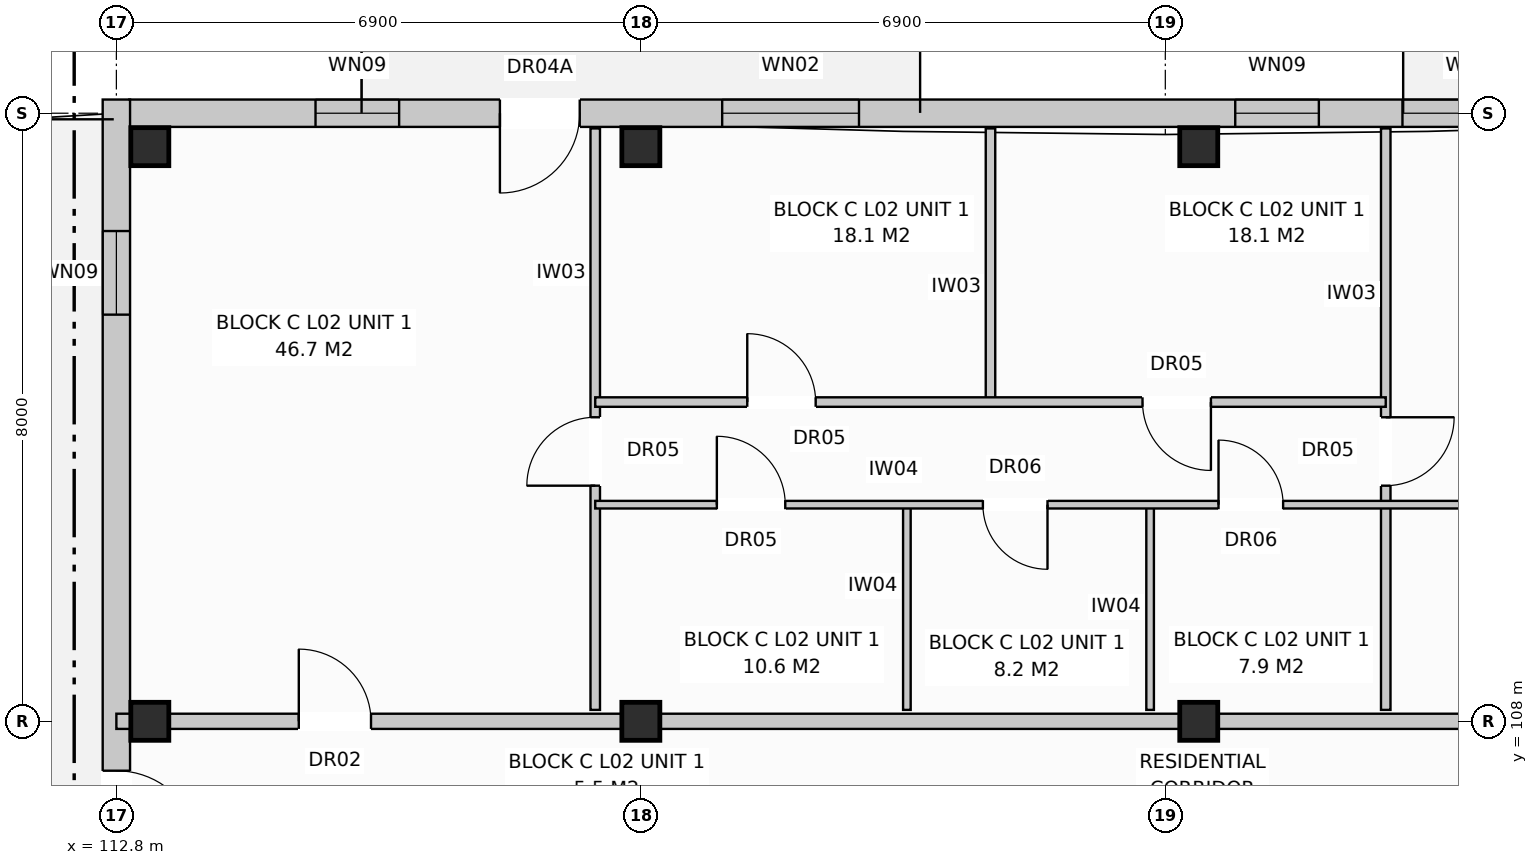
"""IFC4 building model, lengths in metres.
Left out: names, types, materials, properties, quantities, classifications, styles, units other than length and angle.
Written with IfcOpenShell. Run it as: python <this file> out.ifc"""

import sys

from ifc_helpers import new_model, si_unit, direction, frame, frame_2d, origin, origin_with_axes, origin_2d, place, context, subcontext, project, spatial, rectangle, extrude, element, fill, save


model = new_model("IFC4")
c1 = context("Model", 3, precision=1e-05, world=origin(), true_north=direction((0.0, 1.0)))
c2 = subcontext(c1, "Body", "Model", "MODEL_VIEW")
j1 = project(units=[si_unit("LENGTHUNIT", "METRE"), si_unit("PLANEANGLEUNIT", "RADIAN")], contexts=[c1])
p1 = place(None, origin())
s1 = spatial("IfcSite", under=j1, at=p1, CompositionType="ELEMENT")
p2 = place(p1, origin())
s2 = spatial("IfcBuilding", under=s1, at=p2, CompositionType="ELEMENT")
p3 = place(p2, frame((0.0, 0.0, 8.0)))
s3 = spatial("IfcBuildingStorey", under=s2, at=p3, CompositionType="ELEMENT", Elevation=8.0)
for number, where, z_axis, x_axis in (
    (1, (113.24, 108.0, 0.0), (0.0, 0.0, 1.0), (1.0, 0.0, 0.0)),
    (2, (113.24, 115.56, 0.0), (0.0, 0.0, 1.0), (1.0, 0.0, 0.0)),
    (3, (119.7, 108.0, 0.0), (0.0, 0.0, 1.0), (1.0, 0.0, 0.0)),
    (4, (119.7, 115.56, 0.0), (0.0, 0.0, 1.0), (1.0, 0.0, 0.0)),
    (5, (127.04, 108.0, 0.0), (0.0, 0.0, 1.0), (1.0, 0.0, 0.0)),
    (6, (127.04, 115.56, 0.0), (0.0, 0.0, 1.0), (1.0, 0.0, 0.0)),
):
    element("IfcColumn", number, at=place(p3, frame(where, z_axis=z_axis, x_axis=x_axis)), inside=s3, PredefinedType="COLUMN", context=c2, shape_type="SweptSolid", body=[
        extrude(rectangle(XDim=0.5, YDim=0.5, at=origin_2d()), origin(), (0.0, 0.0, 1.0), 3.2),
    ])
p4 = place(p3, frame((112.97, 116.0, 0.0), z_axis=(0.0, 0.0, 1.0), x_axis=(1.0, 0.0, 0.0)))
e7 = element("IfcWall", 7, at=p4, inside=s3, PredefinedType="STANDARD", context=c2, shape_type="SweptSolid", body=[
    extrude(rectangle(XDim=54.86, YDim=0.36, at=frame_2d((27.43, 0.0))), origin(), (0.0, 0.0, 1.0), 2.94),
])
p5 = place(p4, frame((4.876, 0.0, 0.0)))
e8 = element("IfcOpeningElement", 8, at=p5, cuts=e7, PredefinedType="OPENING", context=c2, shape_type="SweptSolid", body=[
    extrude(rectangle(XDim=1.05, YDim=2.12, at=frame_2d((0.525, 1.06))), frame((0.0, 0.192, 0.0), z_axis=(0.0, -1.0, 0.0), x_axis=(1.0, 0.0, 0.0)), (0.0, 0.0, 1.0), 0.384),
])
p6 = place(p4, frame((18.879, 0.0, 0.0)))
e9 = element("IfcOpeningElement", 9, at=p6, cuts=e7, PredefinedType="OPENING", context=c2, shape_type="SweptSolid", body=[
    extrude(rectangle(XDim=1.05, YDim=2.12, at=frame_2d((0.525, 1.06))), frame((0.0, 0.192, 0.0), z_axis=(0.0, -1.0, 0.0), x_axis=(1.0, 0.0, 0.0)), (0.0, 0.0, 1.0), 0.384),
])
p7 = place(p4, frame((31.379, 0.0, 0.0)))
e10 = element("IfcOpeningElement", 10, at=p7, cuts=e7, PredefinedType="OPENING", context=c2, shape_type="SweptSolid", body=[
    extrude(rectangle(XDim=1.05, YDim=2.12, at=frame_2d((0.525, 1.06))), frame((0.0, 0.192, 0.0), z_axis=(0.0, -1.0, 0.0), x_axis=(1.0, 0.0, 0.0)), (0.0, 0.0, 1.0), 0.384),
])
p8 = place(p4, frame((46.45, 0.0, 0.0)))
e11 = element("IfcOpeningElement", 11, at=p8, cuts=e7, PredefinedType="OPENING", context=c2, shape_type="SweptSolid", body=[
    extrude(rectangle(XDim=1.05, YDim=2.12, at=frame_2d((0.525, 1.06))), frame((0.0, 0.192, 0.0), z_axis=(0.0, -1.0, 0.0), x_axis=(1.0, 0.0, 0.0)), (0.0, 0.0, 1.0), 0.384),
])
p9 = place(p4, frame((2.45, 0.0, 0.72)))
e12 = element("IfcOpeningElement", 12, at=p9, cuts=e7, PredefinedType="OPENING", context=c2, shape_type="SweptSolid", body=[
    extrude(rectangle(XDim=1.1, YDim=1.5, at=frame_2d((0.55, 0.75))), frame((0.0, 0.192, 0.0), z_axis=(0.0, -1.0, 0.0), x_axis=(1.0, 0.0, 0.0)), (0.0, 0.0, 1.0), 0.384),
])
p10 = place(p4, frame((7.8, 0.0, 0.8)))
e13 = element("IfcOpeningElement", 13, at=p10, cuts=e7, PredefinedType="OPENING", context=c2, shape_type="SweptSolid", body=[
    extrude(rectangle(XDim=1.8, YDim=1.7, at=frame_2d((0.9, 0.85))), frame((0.0, 0.192, 0.0), z_axis=(0.0, -1.0, 0.0), x_axis=(1.0, 0.0, 0.0)), (0.0, 0.0, 1.0), 0.384),
])
p11 = place(p4, frame((14.55, 0.0, 0.72)))
e14 = element("IfcOpeningElement", 14, at=p11, cuts=e7, PredefinedType="OPENING", context=c2, shape_type="SweptSolid", body=[
    extrude(rectangle(XDim=1.1, YDim=1.5, at=frame_2d((0.55, 0.75))), frame((0.0, 0.192, 0.0), z_axis=(0.0, -1.0, 0.0), x_axis=(1.0, 0.0, 0.0)), (0.0, 0.0, 1.0), 0.384),
])
p12 = place(p4, frame((16.75, 0.0, 0.8)))
e15 = element("IfcOpeningElement", 15, at=p12, cuts=e7, PredefinedType="OPENING", context=c2, shape_type="SweptSolid", body=[
    extrude(rectangle(XDim=1.9, YDim=1.85, at=frame_2d((0.95, 0.925))), frame((0.0, 0.192, 0.0), z_axis=(0.0, -1.0, 0.0), x_axis=(1.0, 0.0, 0.0)), (0.0, 0.0, 1.0), 0.384),
])
p13 = place(p4, frame((21.6, 0.0, 0.8)))
e16 = element("IfcOpeningElement", 16, at=p13, cuts=e7, PredefinedType="OPENING", context=c2, shape_type="SweptSolid", body=[
    extrude(rectangle(XDim=1.8, YDim=1.7, at=frame_2d((0.9, 0.85))), frame((0.0, 0.192, 0.0), z_axis=(0.0, -1.0, 0.0), x_axis=(1.0, 0.0, 0.0)), (0.0, 0.0, 1.0), 0.384),
])
p14 = place(p4, frame((25.35, 0.0, 0.72)))
e17 = element("IfcOpeningElement", 17, at=p14, cuts=e7, PredefinedType="OPENING", context=c2, shape_type="SweptSolid", body=[
    extrude(rectangle(XDim=1.1, YDim=1.5, at=frame_2d((0.55, 0.75))), frame((0.0, 0.192, 0.0), z_axis=(0.0, -1.0, 0.0), x_axis=(1.0, 0.0, 0.0)), (0.0, 0.0, 1.0), 0.384),
])
p15 = place(p4, frame((29.55, 0.0, 0.72)))
e18 = element("IfcOpeningElement", 18, at=p15, cuts=e7, PredefinedType="OPENING", context=c2, shape_type="SweptSolid", body=[
    extrude(rectangle(XDim=1.1, YDim=1.5, at=frame_2d((0.55, 0.75))), frame((0.0, 0.192, 0.0), z_axis=(0.0, -1.0, 0.0), x_axis=(1.0, 0.0, 0.0)), (0.0, 0.0, 1.0), 0.384),
])
p16 = place(p4, frame((34.9, 0.0, 0.8)))
e19 = element("IfcOpeningElement", 19, at=p16, cuts=e7, PredefinedType="OPENING", context=c2, shape_type="SweptSolid", body=[
    extrude(rectangle(XDim=1.8, YDim=1.7, at=frame_2d((0.9, 0.85))), frame((0.0, 0.192, 0.0), z_axis=(0.0, -1.0, 0.0), x_axis=(1.0, 0.0, 0.0)), (0.0, 0.0, 1.0), 0.384),
])
p17 = place(p4, frame((38.45, 0.0, 0.72)))
e20 = element("IfcOpeningElement", 20, at=p17, cuts=e7, PredefinedType="OPENING", context=c2, shape_type="SweptSolid", body=[
    extrude(rectangle(XDim=1.1, YDim=1.5, at=frame_2d((0.55, 0.75))), frame((0.0, 0.192, 0.0), z_axis=(0.0, -1.0, 0.0), x_axis=(1.0, 0.0, 0.0)), (0.0, 0.0, 1.0), 0.384),
])
p18 = place(p4, frame((42.85, 0.0, 0.72)))
e21 = element("IfcOpeningElement", 21, at=p18, cuts=e7, PredefinedType="OPENING", context=c2, shape_type="SweptSolid", body=[
    extrude(rectangle(XDim=1.1, YDim=1.5, at=frame_2d((0.55, 0.75))), frame((0.0, 0.192, 0.0), z_axis=(0.0, -1.0, 0.0), x_axis=(1.0, 0.0, 0.0)), (0.0, 0.0, 1.0), 0.384),
])
p19 = place(p4, frame((49.2, 0.0, 0.8)))
e22 = element("IfcOpeningElement", 22, at=p19, cuts=e7, PredefinedType="OPENING", context=c2, shape_type="SweptSolid", body=[
    extrude(rectangle(XDim=1.8, YDim=1.7, at=frame_2d((0.9, 0.85))), frame((0.0, 0.192, 0.0), z_axis=(0.0, -1.0, 0.0), x_axis=(1.0, 0.0, 0.0)), (0.0, 0.0, 1.0), 0.384),
])
p20 = place(p4, frame((52.95, 0.0, 0.72)))
e23 = element("IfcOpeningElement", 23, at=p20, cuts=e7, PredefinedType="OPENING", context=c2, shape_type="SweptSolid", body=[
    extrude(rectangle(XDim=1.1, YDim=1.5, at=frame_2d((0.55, 0.75))), frame((0.0, 0.192, 0.0), z_axis=(0.0, -1.0, 0.0), x_axis=(1.0, 0.0, 0.0)), (0.0, 0.0, 1.0), 0.384),
])
p21 = place(p3, frame((112.8, 97.42, 0.0), z_axis=(0.0, 0.0, 1.0), x_axis=(0.0, 1.0, 0.0)))
e24 = element("IfcWall", 24, at=p21, inside=s3, PredefinedType="STANDARD", context=c2, shape_type="SweptSolid", body=[
    extrude(rectangle(XDim=18.76, YDim=0.36, at=frame_2d((9.38, 0.0))), origin(), (0.0, 0.0, 1.0), 2.94),
])
p22 = place(p21, frame((8.83, 0.0, 0.0)))
e25 = element("IfcOpeningElement", 25, at=p22, cuts=e24, PredefinedType="OPENING", context=c2, shape_type="SweptSolid", body=[
    extrude(rectangle(XDim=1.1, YDim=2.1, at=frame_2d((0.55, 1.05))), frame((0.0, 0.192, 0.0), z_axis=(0.0, -1.0, 0.0), x_axis=(1.0, 0.0, 0.0)), (0.0, 0.0, 1.0), 0.384),
])
p23 = place(p21, frame((1.73, 0.0, 0.72)))
e26 = element("IfcOpeningElement", 26, at=p23, cuts=e24, PredefinedType="OPENING", context=c2, shape_type="SweptSolid", body=[
    extrude(rectangle(XDim=1.1, YDim=1.5, at=frame_2d((0.55, 0.75))), frame((0.0, 0.192, 0.0), z_axis=(0.0, -1.0, 0.0), x_axis=(1.0, 0.0, 0.0)), (0.0, 0.0, 1.0), 0.384),
])
p24 = place(p21, frame((15.93, 0.0, 0.72)))
e27 = element("IfcOpeningElement", 27, at=p24, cuts=e24, PredefinedType="OPENING", context=c2, shape_type="SweptSolid", body=[
    extrude(rectangle(XDim=1.1, YDim=1.5, at=frame_2d((0.55, 0.75))), frame((0.0, 0.192, 0.0), z_axis=(0.0, -1.0, 0.0), x_axis=(1.0, 0.0, 0.0)), (0.0, 0.0, 1.0), 0.384),
])
p25 = place(p3, frame((112.8, 108.0, 0.0), z_axis=(0.0, 0.0, 1.0), x_axis=(1.0, 0.0, 0.0)))
e28 = element("IfcWall", 28, at=p25, inside=s3, PredefinedType="PARTITIONING", context=c2, shape_type="SweptSolid", body=[
    extrude(rectangle(XDim=20.7, YDim=0.2, at=frame_2d((10.35, 0.0))), origin(), (0.0, 0.0, 1.0), 2.38),
])
p26 = place(p25, frame((2.4, 0.0, 0.0)))
e29 = element("IfcOpeningElement", 29, at=p26, cuts=e28, PredefinedType="OPENING", context=c2, shape_type="SweptSolid", body=[
    extrude(rectangle(XDim=0.95, YDim=2.15, at=frame_2d((0.475, 1.075))), frame((0.0, 0.112, 0.0), z_axis=(0.0, -1.0, 0.0), x_axis=(1.0, 0.0, 0.0)), (0.0, 0.0, 1.0), 0.224),
])
p27 = place(p3, frame((119.1, 108.15, 0.0), z_axis=(0.0, 0.0, 1.0), x_axis=(0.0, 1.0, 0.0)))
e30 = element("IfcWall", 30, at=p27, inside=s3, PredefinedType="PARTITIONING", context=c2, shape_type="SweptSolid", body=[
    extrude(rectangle(XDim=7.65, YDim=0.125, at=frame_2d((3.825, 0.0))), origin(), (0.0, 0.0, 1.0), 2.94),
])
p28 = place(p27, frame((2.95, 0.0, 0.0)))
e31 = element("IfcOpeningElement", 31, at=p28, cuts=e30, PredefinedType="OPENING", context=c2, shape_type="SweptSolid", body=[
    extrude(rectangle(XDim=0.9, YDim=2.1, at=frame_2d((0.45, 1.05))), frame((0.0, 0.074, 0.0), z_axis=(0.0, -1.0, 0.0), x_axis=(1.0, 0.0, 0.0)), (0.0, 0.0, 1.0), 0.149),
])
for number, where, z_axis, x_axis in (
    (32, (123.2, 108.15, 0.0), (0.0, 0.0, 1.0), (0.0, 1.0, 0.0)),
    (33, (126.4, 108.15, 0.0), (0.0, 0.0, 1.0), (0.0, 1.0, 0.0)),
):
    element("IfcWall", number, at=place(p3, frame(where, z_axis=z_axis, x_axis=x_axis)), inside=s3, PredefinedType="PARTITIONING", context=c2, shape_type="SweptSolid", body=[
        extrude(rectangle(XDim=2.7, YDim=0.1, at=frame_2d((1.35, 0.0))), origin(), (0.0, 0.0, 1.0), 2.94),
    ])
p29 = place(p3, frame((124.3, 112.2, 0.0), z_axis=(0.0, 0.0, 1.0), x_axis=(0.0, 1.0, 0.0)))
e34 = element("IfcWall", 34, at=p29, inside=s3, PredefinedType="PARTITIONING", context=c2, shape_type="SweptSolid", body=[
    extrude(rectangle(XDim=3.6, YDim=0.125, at=frame_2d((1.8, 0.0))), origin(), (0.0, 0.0, 1.0), 2.59),
])
p30 = place(p3, frame((129.5, 108.15, 0.0), z_axis=(0.0, 0.0, 1.0), x_axis=(0.0, 1.0, 0.0)))
e35 = element("IfcWall", 35, at=p30, inside=s3, PredefinedType="PARTITIONING", context=c2, shape_type="SweptSolid", body=[
    extrude(rectangle(XDim=7.65, YDim=0.125, at=frame_2d((3.825, 0.0))), origin(), (0.0, 0.0, 1.0), 2.94),
])
p31 = place(p30, frame((2.95, 0.0, 0.0)))
e36 = element("IfcOpeningElement", 36, at=p31, cuts=e35, PredefinedType="OPENING", context=c2, shape_type="SweptSolid", body=[
    extrude(rectangle(XDim=0.9, YDim=2.1, at=frame_2d((0.45, 1.05))), frame((0.0, 0.074, 0.0), z_axis=(0.0, -1.0, 0.0), x_axis=(1.0, 0.0, 0.0)), (0.0, 0.0, 1.0), 0.149),
])
p32 = place(p3, frame((119.1, 110.85, 0.0), z_axis=(0.0, 0.0, 1.0), x_axis=(1.0, 0.0, 0.0)))
e37 = element("IfcWall", 37, at=p32, inside=s3, PredefinedType="PARTITIONING", context=c2, shape_type="SweptSolid", body=[
    extrude(rectangle(XDim=14.3, YDim=0.1, at=frame_2d((7.15, 0.0))), origin(), (0.0, 0.0, 1.0), 2.94),
])
p33 = place(p32, frame((1.6, 0.0, 0.0)))
e38 = element("IfcOpeningElement", 38, at=p33, cuts=e37, PredefinedType="OPENING", context=c2, shape_type="SweptSolid", body=[
    extrude(rectangle(XDim=0.9, YDim=2.1, at=frame_2d((0.45, 1.05))), frame((0.0, 0.062, 0.0), z_axis=(0.0, -1.0, 0.0), x_axis=(1.0, 0.0, 0.0)), (0.0, 0.0, 1.0), 0.124),
])
p34 = place(p32, frame((5.1, 0.0, 0.0)))
e39 = element("IfcOpeningElement", 39, at=p34, cuts=e37, PredefinedType="OPENING", context=c2, shape_type="SweptSolid", body=[
    extrude(rectangle(XDim=0.85, YDim=2.05, at=frame_2d((0.425, 1.025))), frame((0.0, 0.062, 0.0), z_axis=(0.0, -1.0, 0.0), x_axis=(1.0, 0.0, 0.0)), (0.0, 0.0, 1.0), 0.124),
])
p35 = place(p32, frame((8.2, 0.0, 0.0)))
e40 = element("IfcOpeningElement", 40, at=p35, cuts=e37, PredefinedType="OPENING", context=c2, shape_type="SweptSolid", body=[
    extrude(rectangle(XDim=0.85, YDim=2.05, at=frame_2d((0.425, 1.025))), frame((0.0, 0.062, 0.0), z_axis=(0.0, -1.0, 0.0), x_axis=(1.0, 0.0, 0.0)), (0.0, 0.0, 1.0), 0.124),
])
p36 = place(p32, frame((11.6, 0.0, 0.0)))
e41 = element("IfcOpeningElement", 41, at=p36, cuts=e37, PredefinedType="OPENING", context=c2, shape_type="SweptSolid", body=[
    extrude(rectangle(XDim=0.85, YDim=2.05, at=frame_2d((0.425, 1.025))), frame((0.0, 0.062, 0.0), z_axis=(0.0, -1.0, 0.0), x_axis=(1.0, 0.0, 0.0)), (0.0, 0.0, 1.0), 0.124),
])
p37 = place(p3, frame((119.1, 112.2, 0.0), z_axis=(0.0, 0.0, 1.0), x_axis=(1.0, 0.0, 0.0)))
e42 = element("IfcWall", 42, at=p37, inside=s3, PredefinedType="PARTITIONING", context=c2, shape_type="SweptSolid", body=[
    extrude(rectangle(XDim=10.4, YDim=0.125, at=frame_2d((5.2, 0.0))), origin(), (0.0, 0.0, 1.0), 2.94),
])
p38 = place(p37, frame((2.0, 0.0, 0.0)))
e43 = element("IfcOpeningElement", 43, at=p38, cuts=e42, PredefinedType="OPENING", context=c2, shape_type="SweptSolid", body=[
    extrude(rectangle(XDim=0.9, YDim=2.1, at=frame_2d((0.45, 1.05))), frame((0.0, 0.074, 0.0), z_axis=(0.0, -1.0, 0.0), x_axis=(1.0, 0.0, 0.0)), (0.0, 0.0, 1.0), 0.149),
])
p39 = place(p37, frame((7.2, 0.0, 0.0)))
e44 = element("IfcOpeningElement", 44, at=p39, cuts=e42, PredefinedType="OPENING", context=c2, shape_type="SweptSolid", body=[
    extrude(rectangle(XDim=0.9, YDim=2.1, at=frame_2d((0.45, 1.05))), frame((0.0, 0.074, 0.0), z_axis=(0.0, -1.0, 0.0), x_axis=(1.0, 0.0, 0.0)), (0.0, 0.0, 1.0), 0.149),
])
p40 = place(p5, frame((1.05, 0.0, 0.0), z_axis=(0.0, 0.0, 1.0), x_axis=(-1.0, 0.0, 0.0)))
e45 = element("IfcDoor", 45, at=p40, inside=s3, OperationType="SINGLE_SWING_LEFT", PredefinedType="DOOR", context=c2, shape_type="SweptSolid", body=[
    extrude(rectangle(XDim=1.05, YDim=2.12, at=frame_2d((0.525, 1.06))), frame((0.0, 0.025, 0.0), z_axis=(0.0, -1.0, 0.0), x_axis=(1.0, 0.0, 0.0)), (0.0, 0.0, 1.0), 0.05),
])
fill(e8, e45)
p41 = place(p9, origin_with_axes())
e46 = element("IfcWindow", 46, at=p41, inside=s3, PartitioningType="SINGLE_PANEL", PredefinedType="WINDOW", context=c2, shape_type="SweptSolid", body=[
    extrude(rectangle(XDim=1.1, YDim=1.5, at=frame_2d((0.55, 0.75))), frame((0.0, 0.03, 0.0), z_axis=(0.0, -1.0, 0.0), x_axis=(1.0, 0.0, 0.0)), (0.0, 0.0, 1.0), 0.06),
])
fill(e12, e46)
p42 = place(p10, origin_with_axes())
e47 = element("IfcWindow", 47, at=p42, inside=s3, PartitioningType="SINGLE_PANEL", PredefinedType="WINDOW", context=c2, shape_type="SweptSolid", body=[
    extrude(rectangle(XDim=1.8, YDim=1.7, at=frame_2d((0.9, 0.85))), frame((0.0, 0.03, 0.0), z_axis=(0.0, -1.0, 0.0), x_axis=(1.0, 0.0, 0.0)), (0.0, 0.0, 1.0), 0.06),
])
fill(e13, e47)
p43 = place(p11, origin_with_axes())
e48 = element("IfcWindow", 48, at=p43, inside=s3, PartitioningType="SINGLE_PANEL", PredefinedType="WINDOW", context=c2, shape_type="SweptSolid", body=[
    extrude(rectangle(XDim=1.1, YDim=1.5, at=frame_2d((0.55, 0.75))), frame((0.0, 0.03, 0.0), z_axis=(0.0, -1.0, 0.0), x_axis=(1.0, 0.0, 0.0)), (0.0, 0.0, 1.0), 0.06),
])
fill(e14, e48)
p44 = place(p12, origin_with_axes())
e49 = element("IfcWindow", 49, at=p44, inside=s3, PartitioningType="SINGLE_PANEL", PredefinedType="WINDOW", context=c2, shape_type="SweptSolid", body=[
    extrude(rectangle(XDim=1.9, YDim=1.85, at=frame_2d((0.95, 0.925))), frame((0.0, 0.03, 0.0), z_axis=(0.0, -1.0, 0.0), x_axis=(1.0, 0.0, 0.0)), (0.0, 0.0, 1.0), 0.06),
])
fill(e15, e49)
p45 = place(p22, frame((1.1, 0.0, 0.0), z_axis=(0.0, 0.0, 1.0), x_axis=(-1.0, 0.0, 0.0)))
e50 = element("IfcDoor", 50, at=p45, inside=s3, OperationType="SINGLE_SWING_LEFT", PredefinedType="DOOR", context=c2, shape_type="SweptSolid", body=[
    extrude(rectangle(XDim=1.1, YDim=2.1, at=frame_2d((0.55, 1.05))), frame((0.0, 0.025, 0.0), z_axis=(0.0, -1.0, 0.0), x_axis=(1.0, 0.0, 0.0)), (0.0, 0.0, 1.0), 0.05),
])
fill(e25, e50)
p46 = place(p24, origin_with_axes())
e51 = element("IfcWindow", 51, at=p46, inside=s3, PartitioningType="SINGLE_PANEL", PredefinedType="WINDOW", context=c2, shape_type="SweptSolid", body=[
    extrude(rectangle(XDim=1.1, YDim=1.5, at=frame_2d((0.55, 0.75))), frame((0.0, 0.03, 0.0), z_axis=(0.0, -1.0, 0.0), x_axis=(1.0, 0.0, 0.0)), (0.0, 0.0, 1.0), 0.06),
])
fill(e27, e51)
p47 = place(p26, origin_with_axes())
e52 = element("IfcDoor", 52, at=p47, inside=s3, OperationType="SINGLE_SWING_LEFT", PredefinedType="DOOR", context=c2, shape_type="SweptSolid", body=[
    extrude(rectangle(XDim=0.95, YDim=2.15, at=frame_2d((0.475, 1.075))), frame((0.0, 0.025, 0.0), z_axis=(0.0, -1.0, 0.0), x_axis=(1.0, 0.0, 0.0)), (0.0, 0.0, 1.0), 0.05),
])
fill(e29, e52)
p48 = place(p28, origin_with_axes())
e53 = element("IfcDoor", 53, at=p48, inside=s3, OperationType="SINGLE_SWING_LEFT", PredefinedType="DOOR", context=c2, shape_type="SweptSolid", body=[
    extrude(rectangle(XDim=0.9, YDim=2.1, at=frame_2d((0.45, 1.05))), frame((0.0, 0.025, 0.0), z_axis=(0.0, -1.0, 0.0), x_axis=(1.0, 0.0, 0.0)), (0.0, 0.0, 1.0), 0.05),
])
fill(e31, e53)
p49 = place(p31, frame((0.9, 0.0, 0.0), z_axis=(0.0, 0.0, 1.0), x_axis=(-1.0, 0.0, 0.0)))
e54 = element("IfcDoor", 54, at=p49, inside=s3, OperationType="SINGLE_SWING_RIGHT", PredefinedType="DOOR", context=c2, shape_type="SweptSolid", body=[
    extrude(rectangle(XDim=0.9, YDim=2.1, at=frame_2d((0.45, 1.05))), frame((0.0, 0.025, 0.0), z_axis=(0.0, -1.0, 0.0), x_axis=(1.0, 0.0, 0.0)), (0.0, 0.0, 1.0), 0.05),
])
fill(e36, e54)
p50 = place(p33, origin_with_axes())
e55 = element("IfcDoor", 55, at=p50, inside=s3, OperationType="SINGLE_SWING_LEFT", PredefinedType="DOOR", context=c2, shape_type="SweptSolid", body=[
    extrude(rectangle(XDim=0.9, YDim=2.1, at=frame_2d((0.45, 1.05))), frame((0.0, 0.025, 0.0), z_axis=(0.0, -1.0, 0.0), x_axis=(1.0, 0.0, 0.0)), (0.0, 0.0, 1.0), 0.05),
])
fill(e38, e55)
p51 = place(p34, frame((0.85, 0.0, 0.0), z_axis=(0.0, 0.0, 1.0), x_axis=(-1.0, 0.0, 0.0)))
e56 = element("IfcDoor", 56, at=p51, inside=s3, OperationType="SINGLE_SWING_RIGHT", PredefinedType="DOOR", context=c2, shape_type="SweptSolid", body=[
    extrude(rectangle(XDim=0.85, YDim=2.05, at=frame_2d((0.425, 1.025))), frame((0.0, 0.025, 0.0), z_axis=(0.0, -1.0, 0.0), x_axis=(1.0, 0.0, 0.0)), (0.0, 0.0, 1.0), 0.05),
])
fill(e39, e56)
p52 = place(p35, origin_with_axes())
e57 = element("IfcDoor", 57, at=p52, inside=s3, OperationType="SINGLE_SWING_LEFT", PredefinedType="DOOR", context=c2, shape_type="SweptSolid", body=[
    extrude(rectangle(XDim=0.85, YDim=2.05, at=frame_2d((0.425, 1.025))), frame((0.0, 0.025, 0.0), z_axis=(0.0, -1.0, 0.0), x_axis=(1.0, 0.0, 0.0)), (0.0, 0.0, 1.0), 0.05),
])
fill(e40, e57)
p53 = place(p38, origin_with_axes())
e58 = element("IfcDoor", 58, at=p53, inside=s3, OperationType="SINGLE_SWING_LEFT", PredefinedType="DOOR", context=c2, shape_type="SweptSolid", body=[
    extrude(rectangle(XDim=0.9, YDim=2.1, at=frame_2d((0.45, 1.05))), frame((0.0, 0.025, 0.0), z_axis=(0.0, -1.0, 0.0), x_axis=(1.0, 0.0, 0.0)), (0.0, 0.0, 1.0), 0.05),
])
fill(e43, e58)
p54 = place(p39, frame((0.9, 0.0, 0.0), z_axis=(0.0, 0.0, 1.0), x_axis=(-1.0, 0.0, 0.0)))
e59 = element("IfcDoor", 59, at=p54, inside=s3, OperationType="SINGLE_SWING_RIGHT", PredefinedType="DOOR", context=c2, shape_type="SweptSolid", body=[
    extrude(rectangle(XDim=0.9, YDim=2.1, at=frame_2d((0.45, 1.05))), frame((0.0, 0.025, 0.0), z_axis=(0.0, -1.0, 0.0), x_axis=(1.0, 0.0, 0.0)), (0.0, 0.0, 1.0), 0.05),
])
fill(e44, e59)
save(model, sys.argv[1])
